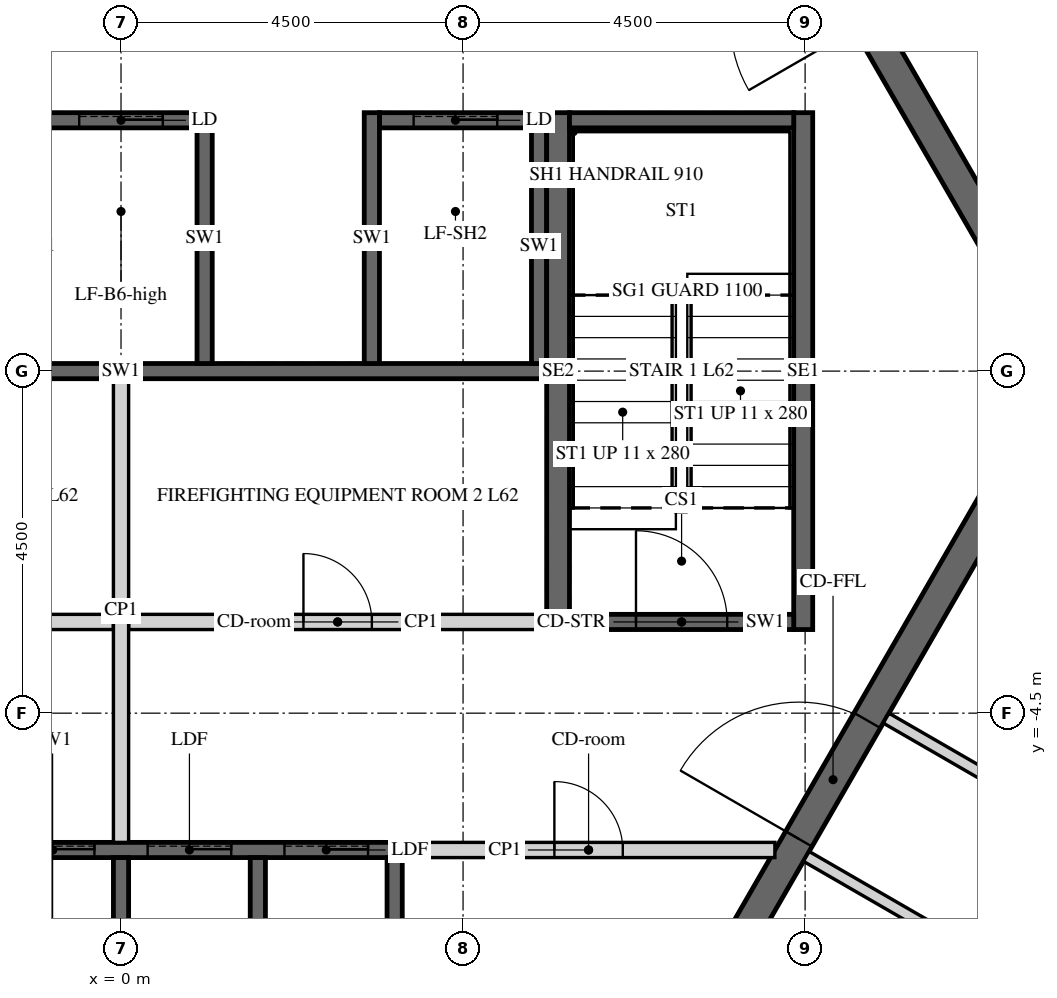
"""IFC4 building model, lengths in metres.
Left out: names, types, materials, properties, quantities, classifications, styles, units other than length and angle.
Written with IfcOpenShell. Run it as: python <this file> out.ifc"""

import sys

from ifc_helpers import new_model, si_unit, direction, frame, frame_2d, origin, place, context, subcontext, project, spatial, polyline, rectangle, outline, extrude, element, fill, save


model = new_model("IFC4")
c1 = context("Model", 3, precision=1e-05, world=origin(), true_north=direction((0.0, 1.0)))
c2 = subcontext(c1, "Body", "Model", "MODEL_VIEW")
j1 = project(units=[si_unit("LENGTHUNIT", "METRE"), si_unit("PLANEANGLEUNIT", "RADIAN")], contexts=[c1])
p1 = place(None, origin())
s1 = spatial("IfcSite", under=j1, at=p1, CompositionType="ELEMENT")
p2 = place(p1, origin())
s2 = spatial("IfcBuilding", under=s1, at=p2, CompositionType="ELEMENT")
p3 = place(p2, frame((0.0, 0.0, 260.1)))
s3 = spatial("IfcBuildingStorey", under=s2, at=p3, CompositionType="ELEMENT", Elevation=260.1)
p4 = place(p3, frame((6.235, -10.8, -0.15), z_axis=(0.0, 0.0, 1.0), x_axis=(0.499996419489, 0.866027470984, 0.0)))
e1 = element("IfcWall", 1, at=p4, inside=s3, PredefinedType="SHEAR", context=c2, shape_type="SweptSolid", body=[
    extrude(outline(polyline([(-0.115, -0.2), (12.586, -0.2), (12.355, 0.2), (0.115, 0.2), (-0.115, -0.2)])), origin(), (0.0, 0.0, 1.0), 3.9),
])
p5 = place(p4, frame((5.364, 0.0, 0.15)))
e2 = element("IfcOpeningElement", 2, at=p5, cuts=e1, PredefinedType="OPENING", context=c2, shape_type="SweptSolid", body=[
    extrude(rectangle(XDim=1.8, YDim=2.4, at=frame_2d((0.9, 1.2))), frame((0.0, 0.21, 0.0), z_axis=(0.0, -1.0, 0.0), x_axis=(1.0, 0.0, 0.0)), (0.0, 0.0, 1.0), 0.42),
])
p6 = place(p3, frame((12.471, 0.0, -0.15), z_axis=(0.0, 0.0, 1.0), x_axis=(-0.499996419489, 0.866027470984, 0.0)))
e3 = element("IfcWall", 3, at=p6, inside=s3, PredefinedType="SHEAR", context=c2, shape_type="SweptSolid", body=[
    extrude(outline(polyline([(-0.115, -0.2), (12.586, -0.2), (12.355, 0.2), (0.115, 0.2), (-0.115, -0.2)])), origin(), (0.0, 0.0, 1.0), 3.9),
])
p7 = place(p6, frame((5.306, 0.0, 0.15)))
e4 = element("IfcOpeningElement", 4, at=p7, cuts=e3, PredefinedType="OPENING", context=c2, shape_type="SweptSolid", body=[
    extrude(rectangle(XDim=1.8, YDim=2.4, at=frame_2d((0.9, 1.2))), frame((0.0, 0.21, 0.0), z_axis=(0.0, -1.0, 0.0), x_axis=(1.0, 0.0, 0.0)), (0.0, 0.0, 1.0), 0.42),
])
p8 = place(p3, frame((-5.6, 3.3, -0.25), z_axis=(0.0, 0.0, 1.0), x_axis=(1.0, 0.0, 0.0)))
e5 = element("IfcWall", 5, at=p8, inside=s3, PredefinedType="SHEAR", context=c2, shape_type="SweptSolid", body=[
    extrude(rectangle(XDim=6.6, YDim=0.2, at=frame_2d((3.3, 0.0))), origin(), (0.0, 0.0, 1.0), 3.9),
])
p9 = place(p8, frame((0.65, 0.0, 0.25)))
e6 = element("IfcOpeningElement", 6, at=p9, cuts=e5, PredefinedType="OPENING", context=c2, shape_type="SweptSolid", body=[
    extrude(rectangle(XDim=1.1, YDim=2.1, at=frame_2d((0.55, 1.05))), frame((0.0, 0.11, 0.0), z_axis=(0.0, -1.0, 0.0), x_axis=(1.0, 0.0, 0.0)), (0.0, 0.0, 1.0), 0.22),
])
p10 = place(p8, frame((2.85, 0.0, 0.25)))
e7 = element("IfcOpeningElement", 7, at=p10, cuts=e5, PredefinedType="OPENING", context=c2, shape_type="SweptSolid", body=[
    extrude(rectangle(XDim=1.1, YDim=2.1, at=frame_2d((0.55, 1.05))), frame((0.0, 0.11, 0.0), z_axis=(0.0, -1.0, 0.0), x_axis=(1.0, 0.0, 0.0)), (0.0, 0.0, 1.0), 0.22),
])
p11 = place(p8, frame((5.05, 0.0, 0.25)))
e8 = element("IfcOpeningElement", 8, at=p11, cuts=e5, PredefinedType="OPENING", context=c2, shape_type="SweptSolid", body=[
    extrude(rectangle(XDim=1.1, YDim=2.1, at=frame_2d((0.55, 1.05))), frame((0.0, 0.11, 0.0), z_axis=(0.0, -1.0, 0.0), x_axis=(1.0, 0.0, 0.0)), (0.0, 0.0, 1.0), 0.22),
])
p12 = place(p3, frame((3.4, 3.3, -0.25), z_axis=(0.0, 0.0, 1.0), x_axis=(1.0, 0.0, 0.0)))
e9 = element("IfcWall", 9, at=p12, inside=s3, PredefinedType="SHEAR", context=c2, shape_type="SweptSolid", body=[
    extrude(rectangle(XDim=2.2, YDim=0.2, at=frame_2d((1.1, 0.0))), origin(), (0.0, 0.0, 1.0), 3.9),
])
p13 = place(p12, frame((0.45, 0.0, 0.25)))
e10 = element("IfcOpeningElement", 10, at=p13, cuts=e9, PredefinedType="OPENING", context=c2, shape_type="SweptSolid", body=[
    extrude(rectangle(XDim=1.1, YDim=2.1, at=frame_2d((0.55, 1.05))), frame((0.0, 0.11, 0.0), z_axis=(0.0, -1.0, 0.0), x_axis=(1.0, 0.0, 0.0)), (0.0, 0.0, 1.0), 0.22),
])
p14 = place(p3, frame((-5.6, 0.0, -0.25), z_axis=(0.0, 0.0, 1.0), x_axis=(1.0, 0.0, 0.0)))
e11 = element("IfcWall", 11, at=p14, inside=s3, PredefinedType="SHEAR", context=c2, shape_type="SweptSolid", body=[
    extrude(rectangle(XDim=11.2, YDim=0.2, at=frame_2d((5.6, 0.0))), origin(), (0.0, 0.0, 1.0), 3.9),
])
for number, where, z_axis, x_axis in (
    (12, (1.1, 0.1, -0.25), (0.0, 0.0, 1.0), (0.0, 1.0, 0.0)),
    (13, (3.3, 0.1, -0.25), (0.0, 0.0, 1.0), (0.0, 1.0, 0.0)),
):
    element("IfcWall", number, at=place(p3, frame(where, z_axis=z_axis, x_axis=x_axis)), inside=s3, PredefinedType="SHEAR", context=c2, shape_type="SweptSolid", body=[
        extrude(rectangle(XDim=3.3, YDim=0.2, at=frame_2d((1.65, 0.0))), origin(), (0.0, 0.0, 1.0), 3.9),
    ])
p15 = place(p3, frame((5.5, 0.1, -0.25), z_axis=(0.0, 0.0, 1.0), x_axis=(0.0, 1.0, 0.0)))
e14 = element("IfcWall", 14, at=p15, inside=s3, PredefinedType="SHEAR", context=c2, shape_type="SweptSolid", body=[
    extrude(rectangle(XDim=3.1, YDim=0.2, at=frame_2d((1.55, 0.0))), origin(), (0.0, 0.0, 1.0), 3.9),
])
p16 = place(p3, frame((-5.5, -6.3, -0.25), z_axis=(0.0, 0.0, 1.0), x_axis=(1.0, 0.0, 0.0)))
e15 = element("IfcWall", 15, at=p16, inside=s3, PredefinedType="SHEAR", context=c2, shape_type="SweptSolid", body=[
    extrude(rectangle(XDim=9.2, YDim=0.2, at=frame_2d((4.6, 0.0))), origin(), (0.0, 0.0, 1.0), 3.9),
])
p17 = place(p16, frame((0.45, 0.0, 0.25)))
e16 = element("IfcOpeningElement", 16, at=p17, cuts=e15, PredefinedType="OPENING", context=c2, shape_type="SweptSolid", body=[
    extrude(rectangle(XDim=1.1, YDim=2.1, at=frame_2d((0.55, 1.05))), frame((0.0, 0.11, 0.0), z_axis=(0.0, -1.0, 0.0), x_axis=(1.0, 0.0, 0.0)), (0.0, 0.0, 1.0), 0.22),
])
p18 = place(p16, frame((2.25, 0.0, 0.25)))
e17 = element("IfcOpeningElement", 17, at=p18, cuts=e15, PredefinedType="OPENING", context=c2, shape_type="SweptSolid", body=[
    extrude(rectangle(XDim=1.1, YDim=2.1, at=frame_2d((0.55, 1.05))), frame((0.0, 0.11, 0.0), z_axis=(0.0, -1.0, 0.0), x_axis=(1.0, 0.0, 0.0)), (0.0, 0.0, 1.0), 0.22),
])
p19 = place(p16, frame((4.05, 0.0, 0.25)))
e18 = element("IfcOpeningElement", 18, at=p19, cuts=e15, PredefinedType="OPENING", context=c2, shape_type="SweptSolid", body=[
    extrude(rectangle(XDim=1.1, YDim=2.1, at=frame_2d((0.55, 1.05))), frame((0.0, 0.11, 0.0), z_axis=(0.0, -1.0, 0.0), x_axis=(1.0, 0.0, 0.0)), (0.0, 0.0, 1.0), 0.22),
])
p20 = place(p16, frame((5.85, 0.0, 0.25)))
e19 = element("IfcOpeningElement", 19, at=p20, cuts=e15, PredefinedType="OPENING", context=c2, shape_type="SweptSolid", body=[
    extrude(rectangle(XDim=1.1, YDim=2.1, at=frame_2d((0.55, 1.05))), frame((0.0, 0.11, 0.0), z_axis=(0.0, -1.0, 0.0), x_axis=(1.0, 0.0, 0.0)), (0.0, 0.0, 1.0), 0.22),
])
p21 = place(p16, frame((7.65, 0.0, 0.25)))
e20 = element("IfcOpeningElement", 20, at=p21, cuts=e15, PredefinedType="OPENING", context=c2, shape_type="SweptSolid", body=[
    extrude(rectangle(XDim=1.1, YDim=2.1, at=frame_2d((0.55, 1.05))), frame((0.0, 0.11, 0.0), z_axis=(0.0, -1.0, 0.0), x_axis=(1.0, 0.0, 0.0)), (0.0, 0.0, 1.0), 0.22),
])
for number, where, z_axis, x_axis in (
    (21, (0.0, -9.3, -0.25), (0.0, 0.0, 1.0), (0.0, 1.0, 0.0)),
    (22, (1.8, -9.3, -0.25), (0.0, 0.0, 1.0), (0.0, 1.0, 0.0)),
    (23, (3.6, -9.3, -0.25), (0.0, 0.0, 1.0), (0.0, 1.0, 0.0)),
):
    element("IfcWall", number, at=place(p3, frame(where, z_axis=z_axis, x_axis=x_axis)), inside=s3, PredefinedType="SHEAR", context=c2, shape_type="SweptSolid", body=[
        extrude(rectangle(XDim=2.9, YDim=0.2, at=frame_2d((1.45, 0.0))), origin(), (0.0, 0.0, 1.0), 3.9),
    ])
p22 = place(p3, frame((-5.6, -3.3, 0.0), z_axis=(0.0, 0.0, 1.0), x_axis=(1.0, 0.0, 0.0)))
e24 = element("IfcWall", 24, at=p22, inside=s3, PredefinedType="PARTITIONING", context=c2, shape_type="SweptSolid", body=[
    extrude(rectangle(XDim=5.5, YDim=0.2, at=frame_2d((2.75, 0.0))), origin(), (0.0, 0.0, 1.0), 3.65),
])
p23 = place(p22, frame((2.3, 0.0, 0.0)))
e25 = element("IfcOpeningElement", 25, at=p23, cuts=e24, PredefinedType="OPENING", context=c2, shape_type="SweptSolid", body=[
    extrude(rectangle(XDim=0.9, YDim=2.1, at=frame_2d((0.45, 1.05))), frame((0.0, 0.11, 0.0), z_axis=(0.0, -1.0, 0.0), x_axis=(1.0, 0.0, 0.0)), (0.0, 0.0, 1.0), 0.22),
])
p24 = place(p3, frame((0.1, -3.3, 0.0), z_axis=(0.0, 0.0, 1.0), x_axis=(1.0, 0.0, 0.0)))
e26 = element("IfcWall", 26, at=p24, inside=s3, PredefinedType="PARTITIONING", context=c2, shape_type="SweptSolid", body=[
    extrude(rectangle(XDim=5.5, YDim=0.2, at=frame_2d((2.75, 0.0))), origin(), (0.0, 0.0, 1.0), 3.65),
])
p25 = place(p24, frame((2.3, 0.0, 0.0)))
e27 = element("IfcOpeningElement", 27, at=p25, cuts=e26, PredefinedType="OPENING", context=c2, shape_type="SweptSolid", body=[
    extrude(rectangle(XDim=0.9, YDim=2.1, at=frame_2d((0.45, 1.05))), frame((0.0, 0.11, 0.0), z_axis=(0.0, -1.0, 0.0), x_axis=(1.0, 0.0, 0.0)), (0.0, 0.0, 1.0), 0.22),
])
p26 = place(p3, frame((0.0, -6.2, 0.0), z_axis=(0.0, 0.0, 1.0), x_axis=(0.0, 1.0, 0.0)))
e28 = element("IfcWall", 28, at=p26, inside=s3, PredefinedType="PARTITIONING", context=c2, shape_type="SweptSolid", body=[
    extrude(rectangle(XDim=6.1, YDim=0.2, at=frame_2d((3.05, 0.0))), origin(), (0.0, 0.0, 1.0), 3.65),
])
p27 = place(p3, frame((3.7, -6.3, 0.0), z_axis=(0.0, 0.0, 1.0), x_axis=(1.0, 0.0, 0.0)))
e29 = element("IfcWall", 29, at=p27, inside=s3, PredefinedType="PARTITIONING", context=c2, shape_type="SweptSolid", body=[
    extrude(rectangle(XDim=4.903, YDim=0.2, at=frame_2d((2.451, 0.0))), origin(), (0.0, 0.0, 1.0), 3.65),
])
p28 = place(p27, frame((2.001, 0.0, 0.0)))
e30 = element("IfcOpeningElement", 30, at=p28, cuts=e29, PredefinedType="OPENING", context=c2, shape_type="SweptSolid", body=[
    extrude(rectangle(XDim=0.9, YDim=2.1, at=frame_2d((0.45, 1.05))), frame((0.0, 0.11, 0.0), z_axis=(0.0, -1.0, 0.0), x_axis=(1.0, 0.0, 0.0)), (0.0, 0.0, 1.0), 0.22),
])
p29 = place(p3, frame((5.75, -3.4, -0.25), z_axis=(0.0, 0.0, 1.0), x_axis=(0.0, 1.0, 0.0)))
e31 = element("IfcWall", 31, at=p29, inside=s3, PredefinedType="SHEAR", context=c2, shape_type="SweptSolid", body=[
    extrude(rectangle(XDim=6.8, YDim=0.3, at=frame_2d((3.4, 0.0))), origin(), (0.0, 0.0, 1.0), 3.9),
])
p30 = place(p3, frame((8.975, -3.4, -0.25), z_axis=(0.0, 0.0, 1.0), x_axis=(0.0, 1.0, 0.0)))
e32 = element("IfcWall", 32, at=p30, inside=s3, PredefinedType="SHEAR", context=c2, shape_type="SweptSolid", body=[
    extrude(rectangle(XDim=6.8, YDim=0.25, at=frame_2d((3.4, 0.0))), origin(), (0.0, 0.0, 1.0), 3.9),
])
p31 = place(p3, frame((5.9, 3.3, -0.25), z_axis=(0.0, 0.0, 1.0), x_axis=(1.0, 0.0, 0.0)))
e33 = element("IfcWall", 33, at=p31, inside=s3, PredefinedType="SHEAR", context=c2, shape_type="SweptSolid", body=[
    extrude(rectangle(XDim=2.95, YDim=0.2, at=frame_2d((1.475, 0.0))), origin(), (0.0, 0.0, 1.0), 3.9),
])
p32 = place(p3, frame((5.9, -3.3, -0.25), z_axis=(0.0, 0.0, 1.0), x_axis=(1.0, 0.0, 0.0)))
e34 = element("IfcWall", 34, at=p32, inside=s3, PredefinedType="SHEAR", context=c2, shape_type="SweptSolid", body=[
    extrude(rectangle(XDim=2.95, YDim=0.2, at=frame_2d((1.475, 0.0))), origin(), (0.0, 0.0, 1.0), 3.9),
])
p33 = place(p32, frame((0.875, 0.0, 0.25)))
e35 = element("IfcOpeningElement", 35, at=p33, cuts=e34, PredefinedType="OPENING", context=c2, shape_type="SweptSolid", body=[
    extrude(rectangle(XDim=1.2, YDim=2.4, at=frame_2d((0.6, 1.2))), frame((0.0, 0.11, 0.0), z_axis=(0.0, -1.0, 0.0), x_axis=(1.0, 0.0, 0.0)), (0.0, 0.0, 1.0), 0.22),
])
p34 = place(p3, frame((19.228, -1.146, 0.0), z_axis=(0.0, 0.0, 1.0), x_axis=(-0.559190017735, 0.829039519001, 0.0)))
e36 = element("IfcWall", 36, at=p34, inside=s3, PredefinedType="PARTITIONING", context=c2, shape_type="SweptSolid", body=[
    extrude(rectangle(XDim=17.273, YDim=0.15, at=frame_2d((8.637, 0.0))), origin(), (0.0, 0.0, 1.0), 2.823),
])
p35 = place(p34, frame((6.478, 0.0, 0.0)))
e37 = element("IfcOpeningElement", 37, at=p35, cuts=e36, PredefinedType="OPENING", context=c2, shape_type="SweptSolid", body=[
    extrude(rectangle(XDim=1.0, YDim=2.1, at=frame_2d((0.5, 1.05))), frame((0.0, 0.085, 0.0), z_axis=(0.0, -1.0, 0.0), x_axis=(1.0, 0.0, 0.0)), (0.0, 0.0, 1.0), 0.17),
])
p36 = place(p3, frame((14.158, -6.928, 0.0), z_axis=(0.0, 0.0, 1.0), x_axis=(-0.866024684746, 0.500001245408, 0.0)))
e38 = element("IfcWall", 38, at=p36, inside=s3, PredefinedType="PARTITIONING", context=c2, shape_type="SweptSolid", body=[
    extrude(rectangle(XDim=4.725, YDim=0.15, at=frame_2d((2.363, 0.0))), origin(), (0.0, 0.0, 1.0), 2.823),
])
p37 = place(p3, frame((9.016, -6.384, 0.0), z_axis=(0.0, 0.0, 1.0), x_axis=(0.866015339567, -0.500017431331, 0.0)))
e39 = element("IfcWall", 39, at=p37, inside=s3, PredefinedType="PARTITIONING", context=c2, shape_type="SweptSolid", body=[
    extrude(rectangle(XDim=4.8, YDim=0.15, at=frame_2d((2.4, 0.0))), origin(), (0.0, 0.0, 1.0), 2.823),
])
p38 = place(p5, origin())
e40 = element("IfcDoor", 40, at=p38, inside=s3, OperationType="DOUBLE_DOOR_SINGLE_SWING", PredefinedType="DOOR", context=c2, shape_type="SweptSolid", body=[
    extrude(rectangle(XDim=1.8, YDim=2.4, at=frame_2d((0.9, 1.2))), frame((0.0, 0.025, 0.0), z_axis=(0.0, -1.0, 0.0), x_axis=(1.0, 0.0, 0.0)), (0.0, 0.0, 1.0), 0.05),
])
fill(e2, e40)
p39 = place(p25, origin())
e41 = element("IfcDoor", 41, at=p39, inside=s3, OperationType="SINGLE_SWING_LEFT", PredefinedType="DOOR", context=c2, shape_type="SweptSolid", body=[
    extrude(rectangle(XDim=0.9, YDim=2.1, at=frame_2d((0.45, 1.05))), frame((0.0, 0.025, 0.0), z_axis=(0.0, -1.0, 0.0), x_axis=(1.0, 0.0, 0.0)), (0.0, 0.0, 1.0), 0.05),
])
fill(e27, e41)
p40 = place(p28, origin())
e42 = element("IfcDoor", 42, at=p40, inside=s3, OperationType="SINGLE_SWING_LEFT", PredefinedType="DOOR", context=c2, shape_type="SweptSolid", body=[
    extrude(rectangle(XDim=0.9, YDim=2.1, at=frame_2d((0.45, 1.05))), frame((0.0, 0.025, 0.0), z_axis=(0.0, -1.0, 0.0), x_axis=(1.0, 0.0, 0.0)), (0.0, 0.0, 1.0), 0.05),
])
fill(e30, e42)
p41 = place(p33, origin())
e43 = element("IfcDoor", 43, at=p41, inside=s3, OperationType="SINGLE_SWING_LEFT", PredefinedType="DOOR", context=c2, shape_type="SweptSolid", body=[
    extrude(rectangle(XDim=1.2, YDim=2.4, at=frame_2d((0.6, 1.2))), frame((0.0, 0.025, 0.0), z_axis=(0.0, -1.0, 0.0), x_axis=(1.0, 0.0, 0.0)), (0.0, 0.0, 1.0), 0.05),
])
fill(e35, e43)
p42 = place(p11, origin())
e44 = element("IfcDoor", 44, at=p42, inside=s3, OperationType="SLIDING_TO_LEFT", PredefinedType="DOOR", context=c2, shape_type="SweptSolid", body=[
    extrude(rectangle(XDim=1.1, YDim=2.1, at=frame_2d((0.55, 1.05))), frame((0.0, 0.025, 0.0), z_axis=(0.0, -1.0, 0.0), x_axis=(1.0, 0.0, 0.0)), (0.0, 0.0, 1.0), 0.05),
])
fill(e8, e44)
p43 = place(p13, origin())
e45 = element("IfcDoor", 45, at=p43, inside=s3, OperationType="SLIDING_TO_LEFT", PredefinedType="DOOR", context=c2, shape_type="SweptSolid", body=[
    extrude(rectangle(XDim=1.1, YDim=2.1, at=frame_2d((0.55, 1.05))), frame((0.0, 0.025, 0.0), z_axis=(0.0, -1.0, 0.0), x_axis=(1.0, 0.0, 0.0)), (0.0, 0.0, 1.0), 0.05),
])
fill(e10, e45)
p44 = place(p19, origin())
e46 = element("IfcDoor", 46, at=p44, inside=s3, OperationType="SLIDING_TO_LEFT", PredefinedType="DOOR", context=c2, shape_type="SweptSolid", body=[
    extrude(rectangle(XDim=1.1, YDim=2.1, at=frame_2d((0.55, 1.05))), frame((0.0, 0.025, 0.0), z_axis=(0.0, -1.0, 0.0), x_axis=(1.0, 0.0, 0.0)), (0.0, 0.0, 1.0), 0.05),
])
fill(e18, e46)
p45 = place(p20, origin())
e47 = element("IfcDoor", 47, at=p45, inside=s3, OperationType="SLIDING_TO_LEFT", PredefinedType="DOOR", context=c2, shape_type="SweptSolid", body=[
    extrude(rectangle(XDim=1.1, YDim=2.1, at=frame_2d((0.55, 1.05))), frame((0.0, 0.025, 0.0), z_axis=(0.0, -1.0, 0.0), x_axis=(1.0, 0.0, 0.0)), (0.0, 0.0, 1.0), 0.05),
])
fill(e19, e47)
p46 = place(p21, origin())
e48 = element("IfcDoor", 48, at=p46, inside=s3, OperationType="SLIDING_TO_LEFT", PredefinedType="DOOR", context=c2, shape_type="SweptSolid", body=[
    extrude(rectangle(XDim=1.1, YDim=2.1, at=frame_2d((0.55, 1.05))), frame((0.0, 0.025, 0.0), z_axis=(0.0, -1.0, 0.0), x_axis=(1.0, 0.0, 0.0)), (0.0, 0.0, 1.0), 0.05),
])
fill(e20, e48)
save(model, sys.argv[1])
